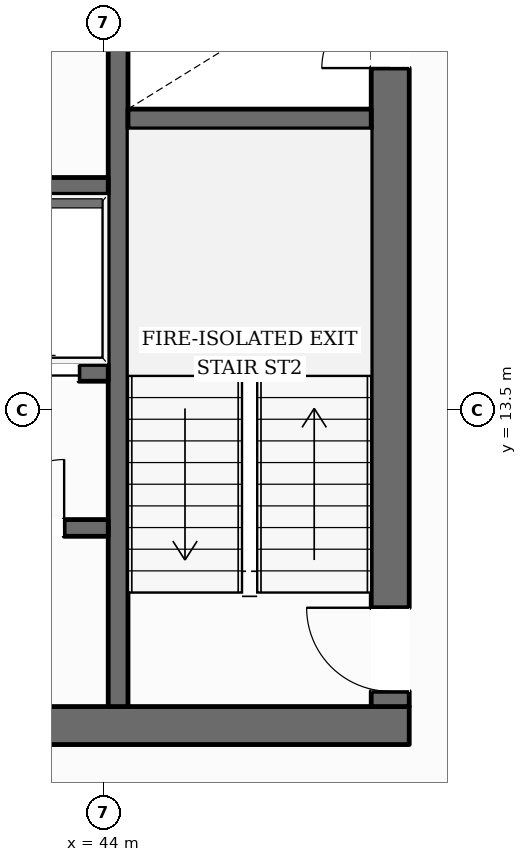
"""IFC4 building model, lengths in metres.
Left out: names, types, materials, properties, quantities, classifications, styles, units other than length and angle.
Written with IfcOpenShell. Run it as: python <this file> out.ifc"""

import sys

from ifc_helpers import new_model, si_unit, direction, frame, frame_2d, origin, place, context, subcontext, project, spatial, rectangle, extrude, element, fill, save


model = new_model("IFC4")
c1 = context("Model", 3, precision=1e-05, world=origin(), true_north=direction((0.0, 1.0)))
c2 = subcontext(c1, "Body", "Model", "MODEL_VIEW")
j1 = project(units=[si_unit("LENGTHUNIT", "METRE"), si_unit("PLANEANGLEUNIT", "RADIAN")], contexts=[c1])
p1 = place(None, origin())
s1 = spatial("IfcSite", under=j1, at=p1, CompositionType="ELEMENT")
p2 = place(p1, origin())
s2 = spatial("IfcBuilding", under=s1, at=p2, CompositionType="ELEMENT")
p3 = place(p2, frame((0.0, 0.0, 89.35)))
s3 = spatial("IfcBuildingStorey", under=s2, at=p3, CompositionType="ELEMENT", Elevation=89.35)
p4 = place(p3, frame((27.98, 9.35, 0.0), z_axis=(0.0, 0.0, 1.0), x_axis=(1.0, 0.0, 0.0)))
e1 = element("IfcWall", 1, at=p4, inside=s3, PredefinedType="SOLIDWALL", context=c2, shape_type="SweptSolid", body=[
    extrude(rectangle(XDim=20.04, YDim=0.5, at=frame_2d((10.02, 0.0))), origin(), (0.0, 0.0, 1.0), 3.6),
])
p5 = place(p4, frame((10.52, 0.0, 0.0)))
e2 = element("IfcOpeningElement", 2, at=p5, cuts=e1, PredefinedType="OPENING", context=c2, shape_type="SweptSolid", body=[
    extrude(rectangle(XDim=1.4, YDim=2.2, at=frame_2d((0.7, 1.1))), frame((0.0, 0.26, 0.0), z_axis=(0.0, -1.0, 0.0), x_axis=(1.0, 0.0, 0.0)), (0.0, 0.0, 1.0), 0.52),
])
p6 = place(p3, frame((47.77, 9.6, 0.0), z_axis=(0.0, 0.0, 1.0), x_axis=(0.0, 1.0, 0.0)))
e3 = element("IfcWall", 3, at=p6, inside=s3, PredefinedType="SOLIDWALL", context=c2, shape_type="SweptSolid", body=[
    extrude(rectangle(XDim=13.0, YDim=0.5, at=frame_2d((6.5, 0.0))), origin(), (0.0, 0.0, 1.0), 3.6),
])
p7 = place(p6, frame((0.2, 0.0, 0.0)))
e4 = element("IfcOpeningElement", 4, at=p7, cuts=e3, PredefinedType="OPENING", context=c2, shape_type="SweptSolid", body=[
    extrude(rectangle(XDim=1.1, YDim=2.15, at=frame_2d((0.55, 1.075))), frame((0.0, 0.26, 0.0), z_axis=(0.0, -1.0, 0.0), x_axis=(1.0, 0.0, 0.0)), (0.0, 0.0, 1.0), 0.52),
])
p8 = place(p6, frame((8.4, 0.0, 0.0)))
e5 = element("IfcOpeningElement", 5, at=p8, cuts=e3, PredefinedType="OPENING", context=c2, shape_type="SweptSolid", body=[
    extrude(rectangle(XDim=0.9, YDim=2.1, at=frame_2d((0.45, 1.05))), frame((0.0, 0.26, 0.0), z_axis=(0.0, -1.0, 0.0), x_axis=(1.0, 0.0, 0.0)), (0.0, 0.0, 1.0), 0.52),
])
p9 = place(p3, frame((44.19, 9.6, 0.0), z_axis=(0.0, 0.0, 1.0), x_axis=(0.0, 1.0, 0.0)))
e6 = element("IfcWall", 6, at=p9, inside=s3, PredefinedType="SHEAR", context=c2, shape_type="SweptSolid", body=[
    extrude(rectangle(XDim=13.0, YDim=0.26, at=frame_2d((6.5, 0.0))), origin(), (0.0, 0.0, 1.0), 3.6),
])
p10 = place(p9, frame((10.925, 0.0, 0.0)))
e7 = element("IfcOpeningElement", 7, at=p10, cuts=e6, PredefinedType="OPENING", context=c2, shape_type="SweptSolid", body=[
    extrude(rectangle(XDim=1.25, YDim=2.25, at=frame_2d((0.625, 1.125))), frame((0.0, 0.14, 0.0), z_axis=(0.0, -1.0, 0.0), x_axis=(1.0, 0.0, 0.0)), (0.0, 0.0, 1.0), 0.28),
])
p11 = place(p3, frame((44.32, 17.33, 0.0), z_axis=(0.0, 0.0, 1.0), x_axis=(1.0, 0.0, 0.0)))
e8 = element("IfcWall", 8, at=p11, inside=s3, PredefinedType="SHEAR", context=c2, shape_type="SweptSolid", body=[
    extrude(rectangle(XDim=3.2, YDim=0.26, at=frame_2d((1.6, 0.0))), origin(), (0.0, 0.0, 1.0), 3.6),
])
p12 = place(p3, frame((31.94, 16.45, 0.0), z_axis=(0.0, 0.0, 1.0), x_axis=(1.0, 0.0, 0.0)))
e9 = element("IfcWall", 9, at=p12, inside=s3, PredefinedType="SOLIDWALL", context=c2, shape_type="SweptSolid", body=[
    extrude(rectangle(XDim=12.12, YDim=0.22, at=frame_2d((6.06, 0.0))), origin(), (0.0, 0.0, 1.0), 3.6),
])
p13 = place(p3, frame((31.94, 13.99, 0.0), z_axis=(0.0, 0.0, 1.0), x_axis=(1.0, 0.0, 0.0)))
e10 = element("IfcWall", 10, at=p13, inside=s3, PredefinedType="SOLIDWALL", context=c2, shape_type="SweptSolid", body=[
    extrude(rectangle(XDim=12.12, YDim=0.22, at=frame_2d((6.06, 0.0))), origin(), (0.0, 0.0, 1.0), 3.6),
])
p14 = place(p13, frame((2.51, 0.0, 0.0)))
e11 = element("IfcOpeningElement", 11, at=p14, cuts=e10, PredefinedType="OPENING", context=c2, shape_type="SweptSolid", body=[
    extrude(rectangle(XDim=0.9, YDim=2.1, at=frame_2d((0.45, 1.05))), frame((0.0, 0.12, 0.0), z_axis=(0.0, -1.0, 0.0), x_axis=(1.0, 0.0, 0.0)), (0.0, 0.0, 1.0), 0.24),
])
p15 = place(p13, frame((6.535, 0.0, 0.0)))
e12 = element("IfcOpeningElement", 12, at=p15, cuts=e10, PredefinedType="OPENING", context=c2, shape_type="SweptSolid", body=[
    extrude(rectangle(XDim=1.1, YDim=2.2, at=frame_2d((0.55, 1.1))), frame((0.0, 0.12, 0.0), z_axis=(0.0, -1.0, 0.0), x_axis=(1.0, 0.0, 0.0)), (0.0, 0.0, 1.0), 0.24),
])
p16 = place(p13, frame((8.585, 0.0, 0.0)))
e13 = element("IfcOpeningElement", 13, at=p16, cuts=e10, PredefinedType="OPENING", context=c2, shape_type="SweptSolid", body=[
    extrude(rectangle(XDim=1.1, YDim=2.2, at=frame_2d((0.55, 1.1))), frame((0.0, 0.12, 0.0), z_axis=(0.0, -1.0, 0.0), x_axis=(1.0, 0.0, 0.0)), (0.0, 0.0, 1.0), 0.24),
])
p17 = place(p13, frame((10.635, 0.0, 0.0)))
e14 = element("IfcOpeningElement", 14, at=p17, cuts=e10, PredefinedType="OPENING", context=c2, shape_type="SweptSolid", body=[
    extrude(rectangle(XDim=1.1, YDim=2.2, at=frame_2d((0.55, 1.1))), frame((0.0, 0.12, 0.0), z_axis=(0.0, -1.0, 0.0), x_axis=(1.0, 0.0, 0.0)), (0.0, 0.0, 1.0), 0.24),
])
p18 = place(p3, frame((40.28, 11.95, 0.0), z_axis=(0.0, 0.0, 1.0), x_axis=(1.0, 0.0, 0.0)))
e15 = element("IfcWall", 15, at=p18, inside=s3, PredefinedType="SOLIDWALL", context=c2, shape_type="SweptSolid", body=[
    extrude(rectangle(XDim=3.78, YDim=0.22, at=frame_2d((1.89, 0.0))), origin(), (0.0, 0.0, 1.0), 3.6),
])
p19 = place(p18, frame((0.47, 0.0, 0.0)))
e16 = element("IfcOpeningElement", 16, at=p19, cuts=e15, PredefinedType="OPENING", context=c2, shape_type="SweptSolid", body=[
    extrude(rectangle(XDim=0.9, YDim=2.1, at=frame_2d((0.45, 1.05))), frame((0.0, 0.12, 0.0), z_axis=(0.0, -1.0, 0.0), x_axis=(1.0, 0.0, 0.0)), (0.0, 0.0, 1.0), 0.24),
])
p20 = place(p18, frame((2.3, 0.0, 0.0)))
e17 = element("IfcOpeningElement", 17, at=p20, cuts=e15, PredefinedType="OPENING", context=c2, shape_type="SweptSolid", body=[
    extrude(rectangle(XDim=0.9, YDim=2.1, at=frame_2d((0.45, 1.05))), frame((0.0, 0.12, 0.0), z_axis=(0.0, -1.0, 0.0), x_axis=(1.0, 0.0, 0.0)), (0.0, 0.0, 1.0), 0.24),
])
p21 = place(p3, frame((44.253, 44.609, 0.0), z_axis=(0.0, 0.0, 1.0), x_axis=(0.493917790196, -0.869508606356, 0.0)))
e18 = element("IfcWall", 18, at=p21, inside=s3, PredefinedType="STANDARD", context=c2, shape_type="SweptSolid", body=[
    extrude(rectangle(XDim=35.62, YDim=0.38, at=frame_2d((17.81, 0.0))), origin(), (0.0, 0.0, 1.0), 3.059),
])
p22 = place(p21, frame((8.505, 0.0, 0.0)))
e19 = element("IfcOpeningElement", 19, at=p22, cuts=e18, PredefinedType="OPENING", context=c2, shape_type="SweptSolid", body=[
    extrude(rectangle(XDim=1.0, YDim=2.2, at=frame_2d((0.5, 1.1))), frame((0.0, 0.2, 0.0), z_axis=(0.0, -1.0, 0.0), x_axis=(1.0, 0.0, 0.0)), (0.0, 0.0, 1.0), 0.4),
])
p23 = place(p21, frame((31.483, 0.0, 0.65)))
e20 = element("IfcOpeningElement", 20, at=p23, cuts=e18, PredefinedType="OPENING", context=c2, shape_type="SweptSolid", body=[
    extrude(rectangle(XDim=1.55, YDim=1.75, at=frame_2d((0.775, 0.875))), frame((0.0, 0.2, 0.0), z_axis=(0.0, -1.0, 0.0), x_axis=(1.0, 0.0, 0.0)), (0.0, 0.0, 1.0), 0.4),
])
p24 = place(p21, frame((25.705, 0.0, 0.65)))
e21 = element("IfcOpeningElement", 21, at=p24, cuts=e18, PredefinedType="OPENING", context=c2, shape_type="SweptSolid", body=[
    extrude(rectangle(XDim=1.55, YDim=1.75, at=frame_2d((0.775, 0.875))), frame((0.0, 0.2, 0.0), z_axis=(0.0, -1.0, 0.0), x_axis=(1.0, 0.0, 0.0)), (0.0, 0.0, 1.0), 0.4),
])
p25 = place(p21, frame((19.927, 0.0, 0.65)))
e22 = element("IfcOpeningElement", 22, at=p25, cuts=e18, PredefinedType="OPENING", context=c2, shape_type="SweptSolid", body=[
    extrude(rectangle(XDim=1.55, YDim=1.75, at=frame_2d((0.775, 0.875))), frame((0.0, 0.2, 0.0), z_axis=(0.0, -1.0, 0.0), x_axis=(1.0, 0.0, 0.0)), (0.0, 0.0, 1.0), 0.4),
])
p26 = place(p21, frame((2.594, 0.0, 0.65)))
e23 = element("IfcOpeningElement", 23, at=p26, cuts=e18, PredefinedType="OPENING", context=c2, shape_type="SweptSolid", body=[
    extrude(rectangle(XDim=1.55, YDim=1.75, at=frame_2d((0.775, 0.875))), frame((0.0, 0.2, 0.0), z_axis=(0.0, -1.0, 0.0), x_axis=(1.0, 0.0, 0.0)), (0.0, 0.0, 1.0), 0.4),
])
p27 = place(p7, origin())
e24 = element("IfcDoor", 24, at=p27, inside=s3, OperationType="SINGLE_SWING_RIGHT", PredefinedType="DOOR", context=c2, shape_type="SweptSolid", body=[
    extrude(rectangle(XDim=1.1, YDim=2.15, at=frame_2d((0.55, 1.075))), frame((0.0, 0.025, 0.0), z_axis=(0.0, -1.0, 0.0), x_axis=(1.0, 0.0, 0.0)), (0.0, 0.0, 1.0), 0.05),
])
fill(e4, e24)
p28 = place(p8, origin())
e25 = element("IfcDoor", 25, at=p28, inside=s3, OperationType="SINGLE_SWING_LEFT", PredefinedType="DOOR", context=c2, shape_type="SweptSolid", body=[
    extrude(rectangle(XDim=0.9, YDim=2.1, at=frame_2d((0.45, 1.05))), frame((0.0, 0.025, 0.0), z_axis=(0.0, -1.0, 0.0), x_axis=(1.0, 0.0, 0.0)), (0.0, 0.0, 1.0), 0.05),
])
fill(e5, e25)
p29 = place(p17, origin())
e26 = element("IfcDoor", 26, at=p29, inside=s3, OperationType="DOUBLE_DOOR_SLIDING", PredefinedType="DOOR", context=c2, shape_type="SweptSolid", body=[
    extrude(rectangle(XDim=1.1, YDim=2.2, at=frame_2d((0.55, 1.1))), frame((0.0, 0.025, 0.0), z_axis=(0.0, -1.0, 0.0), x_axis=(1.0, 0.0, 0.0)), (0.0, 0.0, 1.0), 0.05),
])
fill(e14, e26)
p30 = place(p20, origin())
e27 = element("IfcDoor", 27, at=p30, inside=s3, OperationType="SINGLE_SWING_RIGHT", PredefinedType="DOOR", context=c2, shape_type="SweptSolid", body=[
    extrude(rectangle(XDim=0.9, YDim=2.1, at=frame_2d((0.45, 1.05))), frame((0.0, 0.025, 0.0), z_axis=(0.0, -1.0, 0.0), x_axis=(1.0, 0.0, 0.0)), (0.0, 0.0, 1.0), 0.05),
])
fill(e17, e27)
save(model, sys.argv[1])
